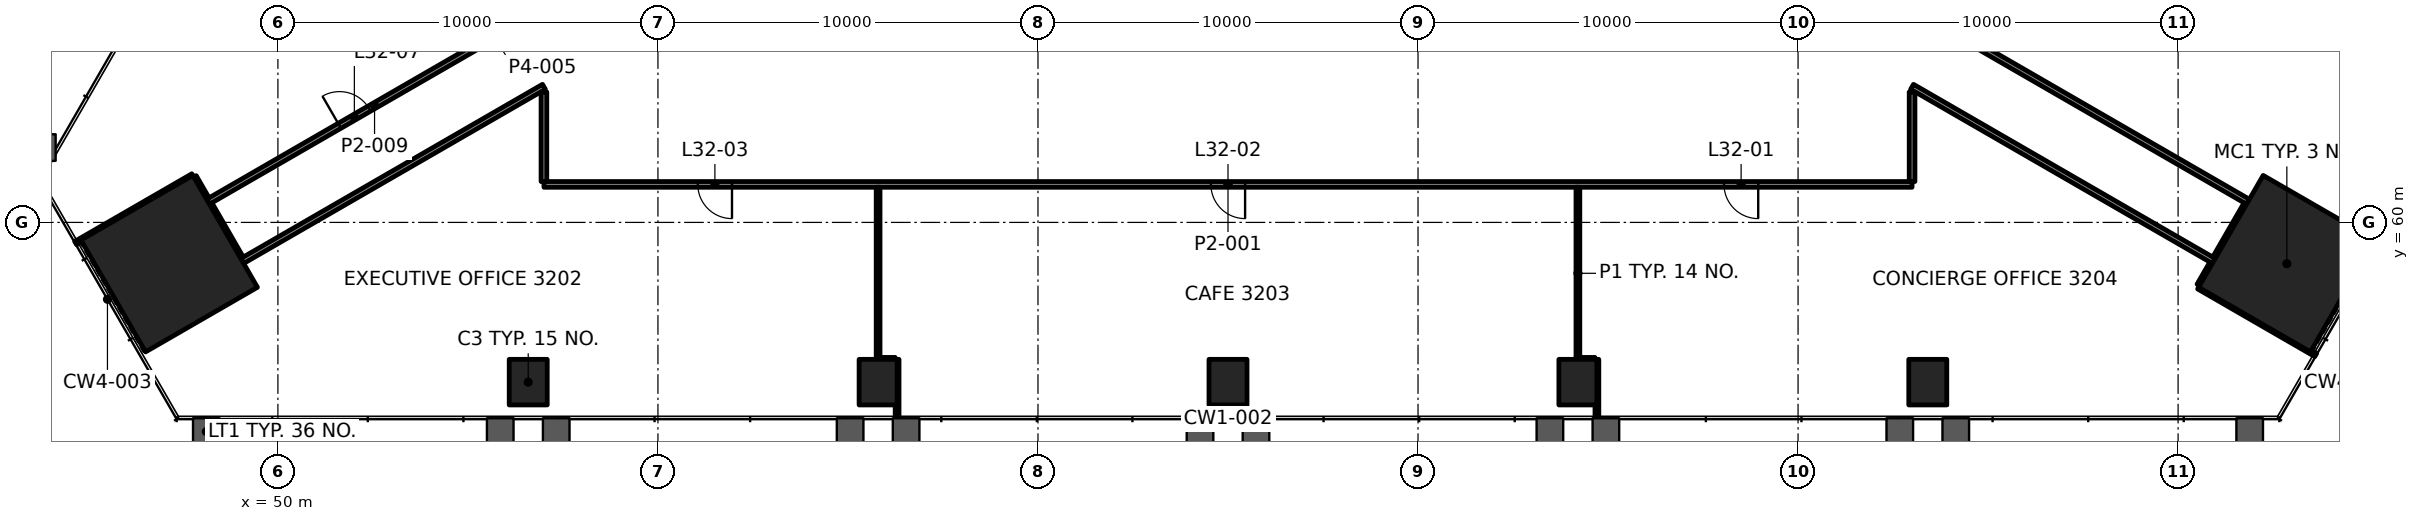
"""IFC4 building model, lengths in metres.
Left out: names, types, materials, properties, quantities, classifications, styles, units other than length and angle.
Written with IfcOpenShell. Run it as: python <this file> out.ifc"""

import sys

from ifc_helpers import new_model, si_unit, direction, frame, frame_2d, origin, origin_2d, place, context, subcontext, project, spatial, rectangle, extrude, element, fill, save


model = new_model("IFC4")
c1 = context("Model", 3, precision=1e-05, world=origin(), true_north=direction((0.0, 1.0)))
c2 = subcontext(c1, "Body", "Model", "MODEL_VIEW")
j1 = project(units=[si_unit("LENGTHUNIT", "METRE"), si_unit("PLANEANGLEUNIT", "RADIAN")], contexts=[c1])
p1 = place(None, origin())
s1 = spatial("IfcSite", under=j1, at=p1, CompositionType="ELEMENT")
p2 = place(p1, origin())
s2 = spatial("IfcBuilding", under=s1, at=p2, CompositionType="ELEMENT")
p3 = place(p2, frame((0.0, 0.0, 140.8)))
s3 = spatial("IfcBuildingStorey", under=s2, at=p3, CompositionType="ELEMENT", Elevation=140.8)
for number, where, z_axis, x_axis in (
    (1, (102.861, 58.914, 0.0), (0.0, 0.0, 1.0), (0.5, 0.866, 0.0)),
    (2, (47.139, 58.914, 0.0), (0.0, 0.0, 1.0), (0.5, -0.866, 0.0)),
):
    element("IfcColumn", number, at=place(p3, frame(where, z_axis=z_axis, x_axis=x_axis)), inside=s3, PredefinedType="COLUMN", context=c2, shape_type="SweptSolid", body=[
        extrude(rectangle(XDim=3.4, YDim=3.4, at=origin_2d()), origin(), (0.0, 0.0, 1.0), 6.0),
    ])
for number, where, z_axis, x_axis in (
    (3, (56.586, 55.797, -0.0), (0.0, 0.0, 1.0), (1.0, 0.0, 0.0)),
    (4, (65.793, 55.797, -0.0), (0.0, 0.0, 1.0), (1.0, 0.0, 0.0)),
    (5, (75.0, 55.797, -0.0), (0.0, 0.0, 1.0), (1.0, 0.0, 0.0)),
    (6, (84.207, 55.797, -0.0), (0.0, 0.0, 1.0), (1.0, 0.0, 0.0)),
    (7, (93.414, 55.797, -0.0), (0.0, 0.0, 1.0), (1.0, 0.0, 0.0)),
):
    element("IfcColumn", number, at=place(p3, frame(where, z_axis=z_axis, x_axis=x_axis)), inside=s3, PredefinedType="COLUMN", context=c2, shape_type="SweptSolid", body=[
        extrude(rectangle(XDim=1.0, YDim=1.2, at=origin_2d()), origin(), (0.0, 0.0, 1.0), 6.0),
    ])
p4 = place(p3, frame((65.843, 56.397, 0.0), z_axis=(0.0, 0.0, 1.0), x_axis=(1.0, 0.0, 0.0)))
e8 = element("IfcWall", 8, at=p4, inside=s3, PredefinedType="PARTITIONING", context=c2, shape_type="SweptSolid", body=[
    extrude(rectangle(XDim=0.399, YDim=0.1, at=frame_2d((0.2, 0.0))), origin(), (0.0, 0.0, 1.0), 4.95),
])
p5 = place(p3, frame((84.267, 56.397, 0.0), z_axis=(0.0, 0.0, 1.0), x_axis=(1.0, 0.0, 0.0)))
e9 = element("IfcWall", 9, at=p5, inside=s3, PredefinedType="PARTITIONING", context=c2, shape_type="SweptSolid", body=[
    extrude(rectangle(XDim=0.389, YDim=0.1, at=frame_2d((0.195, 0.0))), origin(), (0.0, 0.0, 1.0), 4.95),
])
p6 = place(p3, frame((93.0, 61.0, 0.0), z_axis=(0.0, 0.0, 1.0), x_axis=(-1.0, 0.0, 0.0)))
e10 = element("IfcWall", 10, at=p6, inside=s3, PredefinedType="PARTITIONING", context=c2, shape_type="SweptSolid", body=[
    extrude(rectangle(XDim=35.999, YDim=0.15, at=frame_2d((18.0, 0.0))), origin(), (0.0, 0.0, 1.0), 4.95),
])
p7 = place(p6, frame((4.048, 0.0, 0.0)))
e11 = element("IfcOpeningElement", 11, at=p7, cuts=e10, PredefinedType="OPENING", context=c2, shape_type="SweptSolid", body=[
    extrude(rectangle(XDim=0.9, YDim=2.1, at=frame_2d((0.45, 1.05))), frame((0.0, 0.085, 0.0), z_axis=(0.0, -1.0, 0.0), x_axis=(1.0, 0.0, 0.0)), (0.0, 0.0, 1.0), 0.17),
])
p8 = place(p6, frame((17.55, 0.0, 0.0)))
e12 = element("IfcOpeningElement", 12, at=p8, cuts=e10, PredefinedType="OPENING", context=c2, shape_type="SweptSolid", body=[
    extrude(rectangle(XDim=0.9, YDim=2.1, at=frame_2d((0.45, 1.05))), frame((0.0, 0.085, 0.0), z_axis=(0.0, -1.0, 0.0), x_axis=(1.0, 0.0, 0.0)), (0.0, 0.0, 1.0), 0.17),
])
p9 = place(p6, frame((31.051, 0.0, 0.0)))
e13 = element("IfcOpeningElement", 13, at=p9, cuts=e10, PredefinedType="OPENING", context=c2, shape_type="SweptSolid", body=[
    extrude(rectangle(XDim=0.9, YDim=2.1, at=frame_2d((0.45, 1.05))), frame((0.0, 0.085, 0.0), z_axis=(0.0, -1.0, 0.0), x_axis=(1.0, 0.0, 0.0)), (0.0, 0.0, 1.0), 0.17),
])
p10 = place(p3, frame((49.061, 58.985, 0.0), z_axis=(0.0, 0.0, 1.0), x_axis=(0.866021929094, 0.500006018292, 0.0)))
e14 = element("IfcWall", 14, at=p10, inside=s3, PredefinedType="PARTITIONING", context=c2, shape_type="SweptSolid", body=[
    extrude(rectangle(XDim=9.167, YDim=0.15, at=frame_2d((4.583, 0.0))), origin(), (0.0, 0.0, 1.0), 4.797),
])
p11 = place(p3, frame((48.161, 60.544, 0.0), z_axis=(0.0, 0.0, 1.0), x_axis=(0.866026893599, 0.499997419557, 0.0)))
e15 = element("IfcWall", 15, at=p11, inside=s3, PredefinedType="PARTITIONING", context=c2, shape_type="SweptSolid", body=[
    extrude(rectangle(XDim=10.12, YDim=0.15, at=frame_2d((5.06, 0.0))), origin(), (0.0, 0.0, 1.0), 4.95),
])
p12 = place(p11, frame((3.996, 0.0, 0.0)))
e16 = element("IfcOpeningElement", 16, at=p12, cuts=e15, PredefinedType="OPENING", context=c2, shape_type="SweptSolid", body=[
    extrude(rectangle(XDim=0.9, YDim=2.1, at=frame_2d((0.45, 1.05))), frame((0.0, 0.085, 0.0), z_axis=(0.0, -1.0, 0.0), x_axis=(1.0, 0.0, 0.0)), (0.0, 0.0, 1.0), 0.17),
])
p13 = place(p11, frame((8.703, 0.0, 0.0)))
e17 = element("IfcOpeningElement", 17, at=p13, cuts=e15, PredefinedType="OPENING", context=c2, shape_type="SweptSolid", body=[
    extrude(rectangle(XDim=1.2, YDim=2.1, at=frame_2d((0.6, 1.05))), frame((0.0, 0.085, 0.0), z_axis=(0.0, -1.0, 0.0), x_axis=(1.0, 0.0, 0.0)), (0.0, 0.0, 1.0), 0.17),
])
p14 = place(p3, frame((44.678, 59.457, 0.0), z_axis=(0.0, 0.0, 1.0), x_axis=(0.866031398331, 0.499989616998, 0.0)))
e18 = element("IfcWall", 18, at=p14, inside=s3, PredefinedType="PARTITIONING", context=c2, shape_type="SweptSolid", body=[
    extrude(rectangle(XDim=3.56, YDim=0.1, at=frame_2d((1.78, 0.0))), origin(), (0.0, 0.0, 1.0), 4.95),
])
p15 = place(p3, frame((100.564, 58.336, 0.0), z_axis=(0.0, 0.0, 1.0), x_axis=(0.500108776725, 0.865962592404, 0.0)))
e19 = element("IfcWall", 19, at=p15, inside=s3, PredefinedType="PARTITIONING", context=c2, shape_type="SweptSolid", body=[
    extrude(rectangle(XDim=0.675, YDim=0.15, at=frame_2d((0.337, 0.0))), origin(), (0.0, 0.0, 1.0), 4.95),
])
p16 = place(p3, frame((93.0, 61.075, 0.0), z_axis=(0.0, 0.0, 1.0), x_axis=(0.0, 1.0, 0.0)))
e20 = element("IfcWall", 20, at=p16, inside=s3, PredefinedType="PARTITIONING", context=c2, shape_type="SweptSolid", body=[
    extrude(rectangle(XDim=2.356, YDim=0.15, at=frame_2d((1.178, 0.0))), origin(), (0.0, 0.0, 1.0), 4.95),
])
p17 = place(p3, frame((84.707, 54.836, 0.0), z_axis=(0.0, 0.0, 1.0), x_axis=(0.0, 1.0, 0.0)))
e21 = element("IfcWall", 21, at=p17, inside=s3, PredefinedType="PARTITIONING", context=c2, shape_type="SweptSolid", body=[
    extrude(rectangle(XDim=1.56, YDim=0.1, at=frame_2d((0.78, 0.0))), origin(), (0.0, 0.0, 1.0), 4.715),
])
p18 = place(p3, frame((84.207, 56.396, 0.0), z_axis=(0.0, 0.0, 1.0), x_axis=(0.0, 1.0, 0.0)))
e22 = element("IfcWall", 22, at=p18, inside=s3, PredefinedType="PARTITIONING", context=c2, shape_type="SweptSolid", body=[
    extrude(rectangle(XDim=4.529, YDim=0.1, at=frame_2d((2.264, 0.0))), origin(), (0.0, 0.0, 1.0), 4.95),
])
p19 = place(p3, frame((66.293, 54.836, 0.0), z_axis=(0.0, 0.0, 1.0), x_axis=(0.0, 1.0, 0.0)))
e23 = element("IfcWall", 23, at=p19, inside=s3, PredefinedType="PARTITIONING", context=c2, shape_type="SweptSolid", body=[
    extrude(rectangle(XDim=1.56, YDim=0.1, at=frame_2d((0.78, 0.0))), origin(), (0.0, 0.0, 1.0), 4.715),
])
p20 = place(p3, frame((65.793, 56.396, 0.0), z_axis=(0.0, 0.0, 1.0), x_axis=(0.0, 1.0, 0.0)))
e24 = element("IfcWall", 24, at=p20, inside=s3, PredefinedType="PARTITIONING", context=c2, shape_type="SweptSolid", body=[
    extrude(rectangle(XDim=4.529, YDim=0.1, at=frame_2d((2.264, 0.0))), origin(), (0.0, 0.0, 1.0), 4.95),
])
p21 = place(p3, frame((57.0, 61.075, 0.0), z_axis=(0.0, 0.0, 1.0), x_axis=(0.0, 1.0, 0.0)))
e25 = element("IfcWall", 25, at=p21, inside=s3, PredefinedType="PARTITIONING", context=c2, shape_type="SweptSolid", body=[
    extrude(rectangle(XDim=2.356, YDim=0.15, at=frame_2d((1.178, 0.0))), origin(), (0.0, 0.0, 1.0), 4.95),
])
p22 = place(p3, frame((49.023, 59.05, 0.0), z_axis=(0.0, 0.0, 1.0), x_axis=(-0.499991515992, 0.866030301974, 0.0)))
e26 = element("IfcWall", 26, at=p22, inside=s3, PredefinedType="PARTITIONING", context=c2, shape_type="SweptSolid", body=[
    extrude(rectangle(XDim=1.649, YDim=0.15, at=frame_2d((0.825, 0.0))), origin(), (0.0, 0.0, 1.0), 4.797),
])
p23 = place(p3, frame((101.839, 60.544, 0.0), z_axis=(0.0, 0.0, 1.0), x_axis=(-0.86602086214, 0.500007866276, 0.0)))
e27 = element("IfcWall", 27, at=p23, inside=s3, PredefinedType="PARTITIONING", context=c2, shape_type="SweptSolid", body=[
    extrude(rectangle(XDim=10.119, YDim=0.15, at=frame_2d((5.06, 0.0))), origin(), (0.0, 0.0, 1.0), 4.95),
])
p24 = place(p3, frame((100.939, 58.985, 0.0), z_axis=(0.0, 0.0, 1.0), x_axis=(-0.866023713276, 0.500002928035, 0.0)))
e28 = element("IfcWall", 28, at=p24, inside=s3, PredefinedType="PARTITIONING", context=c2, shape_type="SweptSolid", body=[
    extrude(rectangle(XDim=9.167, YDim=0.15, at=frame_2d((4.584, 0.0))), origin(), (0.0, 0.0, 1.0), 4.797),
])
p25 = place(p3, frame((103.622, 56.512, 0.0), z_axis=(0.0, 0.0, 1.0), x_axis=(-0.866031398331, 0.499989616998, 0.0)))
e29 = element("IfcWall", 29, at=p25, inside=s3, PredefinedType="PARTITIONING", context=c2, shape_type="SweptSolid", body=[
    extrude(rectangle(XDim=3.56, YDim=0.1, at=frame_2d((1.78, 0.0))), origin(), (0.0, 0.0, 1.0), 4.95),
])
p26 = place(p3, frame((48.123, 60.608, 0.0), z_axis=(0.0, 0.0, 1.0), x_axis=(-0.499837337514, 0.866119296648, 0.0)))
e30 = element("IfcWall", 30, at=p26, inside=s3, PredefinedType="PARTITIONING", context=c2, shape_type="SweptSolid", body=[
    extrude(rectangle(XDim=0.675, YDim=0.15, at=frame_2d((0.337, 0.0))), origin(), (0.0, 0.0, 1.0), 4.95),
])
p27 = place(p3, frame((100.976, 59.05, 0.0), z_axis=(0.0, 0.0, 1.0), x_axis=(0.499991515992, 0.866030301974, 0.0)))
e31 = element("IfcWall", 31, at=p27, inside=s3, PredefinedType="PARTITIONING", context=c2, shape_type="SweptSolid", body=[
    extrude(rectangle(XDim=1.649, YDim=0.15, at=frame_2d((0.825, 0.0))), origin(), (0.0, 0.0, 1.0), 4.797),
])
p28 = place(p7, origin())
e32 = element("IfcDoor", 32, at=p28, inside=s3, OperationType="SINGLE_SWING_RIGHT", PredefinedType="DOOR", context=c2, shape_type="SweptSolid", body=[
    extrude(rectangle(XDim=0.9, YDim=2.1, at=frame_2d((0.45, 1.05))), frame((0.0, 0.025, 0.0), z_axis=(0.0, -1.0, 0.0), x_axis=(1.0, 0.0, 0.0)), (0.0, 0.0, 1.0), 0.05),
])
fill(e11, e32)
p29 = place(p8, origin())
e33 = element("IfcDoor", 33, at=p29, inside=s3, OperationType="SINGLE_SWING_LEFT", PredefinedType="DOOR", context=c2, shape_type="SweptSolid", body=[
    extrude(rectangle(XDim=0.9, YDim=2.1, at=frame_2d((0.45, 1.05))), frame((0.0, 0.025, 0.0), z_axis=(0.0, -1.0, 0.0), x_axis=(1.0, 0.0, 0.0)), (0.0, 0.0, 1.0), 0.05),
])
fill(e12, e33)
p30 = place(p9, origin())
e34 = element("IfcDoor", 34, at=p30, inside=s3, OperationType="SINGLE_SWING_RIGHT", PredefinedType="DOOR", context=c2, shape_type="SweptSolid", body=[
    extrude(rectangle(XDim=0.9, YDim=2.1, at=frame_2d((0.45, 1.05))), frame((0.0, 0.025, 0.0), z_axis=(0.0, -1.0, 0.0), x_axis=(1.0, 0.0, 0.0)), (0.0, 0.0, 1.0), 0.05),
])
fill(e13, e34)
p31 = place(p12, origin())
e35 = element("IfcDoor", 35, at=p31, inside=s3, OperationType="SINGLE_SWING_RIGHT", PredefinedType="DOOR", context=c2, shape_type="SweptSolid", body=[
    extrude(rectangle(XDim=0.9, YDim=2.1, at=frame_2d((0.45, 1.05))), frame((0.0, 0.025, 0.0), z_axis=(0.0, -1.0, 0.0), x_axis=(1.0, 0.0, 0.0)), (0.0, 0.0, 1.0), 0.05),
])
fill(e16, e35)
save(model, sys.argv[1])
